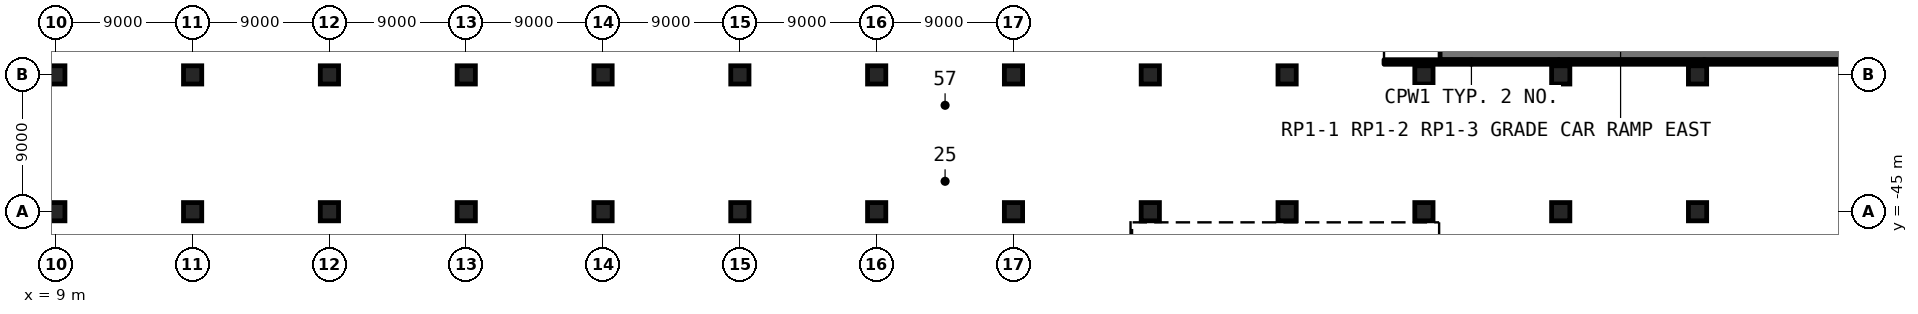
"""IFC4 building model, lengths in metres.
Left out: names, types, materials, properties, quantities, classifications, styles, units other than length and angle.
Written with IfcOpenShell. Run it as: python <this file> out.ifc"""

import sys

from ifc_helpers import new_model, si_unit, direction, frame, frame_2d, origin, origin_2d, place, context, subcontext, project, spatial, polyline, rectangle, outline, extrude, element, save


model = new_model("IFC4")
c1 = context("Model", 3, precision=1e-05, world=origin(), true_north=direction((0.0, 1.0)))
c2 = subcontext(c1, "Body", "Model", "MODEL_VIEW")
j1 = project(units=[si_unit("LENGTHUNIT", "METRE"), si_unit("PLANEANGLEUNIT", "RADIAN")], contexts=[c1])
p1 = place(None, origin())
s1 = spatial("IfcSite", under=j1, at=p1, CompositionType="ELEMENT")
p2 = place(p1, origin())
s2 = spatial("IfcBuilding", under=s1, at=p2, CompositionType="ELEMENT")
p3 = place(p2, frame((0.0, 0.0, -4.5)))
s3 = spatial("IfcBuildingStorey", under=s2, at=p3, CompositionType="ELEMENT", Elevation=-4.5)
for number, where, z_axis, x_axis in (
    (1, (9.0, -45.0, 0.0), (0.0, 0.0, 1.0), (1.0, 0.0, 0.0)),
    (2, (9.0, -36.0, 0.0), (0.0, 0.0, 1.0), (1.0, 0.0, 0.0)),
    (3, (18.0, -45.0, 0.0), (0.0, 0.0, 1.0), (1.0, 0.0, 0.0)),
    (4, (18.0, -36.0, 0.0), (0.0, 0.0, 1.0), (1.0, 0.0, 0.0)),
    (5, (27.0, -45.0, 0.0), (0.0, 0.0, 1.0), (1.0, 0.0, 0.0)),
    (6, (27.0, -36.0, 0.0), (0.0, 0.0, 1.0), (1.0, 0.0, 0.0)),
    (7, (36.0, -45.0, 0.0), (0.0, 0.0, 1.0), (1.0, 0.0, 0.0)),
    (8, (36.0, -36.0, 0.0), (0.0, 0.0, 1.0), (1.0, 0.0, 0.0)),
    (9, (45.0, -45.0, 0.0), (0.0, 0.0, 1.0), (1.0, 0.0, 0.0)),
    (10, (45.0, -36.0, 0.0), (0.0, 0.0, 1.0), (1.0, 0.0, 0.0)),
    (11, (54.0, -45.0, 0.0), (0.0, 0.0, 1.0), (1.0, 0.0, 0.0)),
    (12, (54.0, -36.0, 0.0), (0.0, 0.0, 1.0), (1.0, 0.0, 0.0)),
    (13, (63.0, -45.0, 0.0), (0.0, 0.0, 1.0), (1.0, 0.0, 0.0)),
    (14, (63.0, -36.0, 0.0), (0.0, 0.0, 1.0), (1.0, 0.0, 0.0)),
    (15, (72.0, -45.0, 0.0), (0.0, 0.0, 1.0), (1.0, 0.0, 0.0)),
    (16, (72.0, -36.0, 0.0), (0.0, 0.0, 1.0), (1.0, 0.0, 0.0)),
    (17, (81.0, -45.0, 0.0), (0.0, 0.0, 1.0), (1.0, 0.0, 0.0)),
    (18, (81.0, -36.0, 0.0), (0.0, 0.0, 1.0), (1.0, 0.0, 0.0)),
    (19, (90.0, -45.0, 0.0), (0.0, 0.0, 1.0), (1.0, 0.0, 0.0)),
    (20, (90.0, -36.0, 0.0), (0.0, 0.0, 1.0), (1.0, 0.0, 0.0)),
    (21, (99.0, -45.0, 0.0), (0.0, 0.0, 1.0), (1.0, 0.0, 0.0)),
    (22, (99.0, -36.0, 0.0), (0.0, 0.0, 1.0), (1.0, 0.0, 0.0)),
    (23, (108.0, -45.0, 0.0), (0.0, 0.0, 1.0), (1.0, 0.0, 0.0)),
    (24, (108.0, -36.0, 0.0), (0.0, 0.0, 1.0), (1.0, 0.0, 0.0)),
    (25, (117.0, -45.0, 0.0), (0.0, 0.0, 1.0), (1.0, 0.0, 0.0)),
    (26, (117.0, -36.0, 0.0), (0.0, 0.0, 1.0), (1.0, 0.0, 0.0)),
):
    element("IfcColumn", number, at=place(p3, frame(where, z_axis=z_axis, x_axis=x_axis)), inside=s3, PredefinedType="COLUMN", context=c2, shape_type="SweptSolid", body=[
        extrude(rectangle(XDim=1.2, YDim=1.2, at=origin_2d()), origin(), (0.0, 0.0, 1.0), 4.5),
    ])
p4 = place(p3, frame((100.062, -31.5, 0.0), z_axis=(0.0, 0.0, 1.0), x_axis=(1.0, 0.0, 0.0)))
e27 = element("IfcWall", 27, at=p4, inside=s3, PredefinedType="SOLIDWALL", context=c2, shape_type="SweptSolid", body=[
    extrude(outline(polyline([(0.0, 0.0), (27.438, 0.0), (27.438, 4.2), (24.438, 3.96), (0.0, 0.05), (0.0, 0.0)])), frame((0.0, 3.5, 0.0), z_axis=(0.0, -1.0, 0.0), x_axis=(1.0, 0.0, 0.0)), (0.0, 0.0, 1.0), 7.0),
])
p5 = place(p3, frame((96.375, -35.15, 0.0), z_axis=(0.0, 0.0, 1.0), x_axis=(1.0, 0.0, 0.0)))
e28 = element("IfcWall", 28, at=p5, inside=s3, PredefinedType="SOLIDWALL", context=c2, shape_type="SweptSolid", body=[
    extrude(rectangle(XDim=11.5, YDim=0.3, at=frame_2d((5.75, 0.0))), origin(), (0.0, 0.0, 1.0), 4.05),
])
p6 = place(p3, frame((107.875, -35.15, 0.0), z_axis=(0.0, 0.0, 1.0), x_axis=(1.0, 0.0, 0.0)))
e29 = element("IfcWall", 29, at=p6, inside=s3, PredefinedType="SOLIDWALL", context=c2, shape_type="SweptSolid", body=[
    extrude(rectangle(XDim=19.125, YDim=0.3, at=frame_2d((9.562, 0.0))), origin(), (0.0, 0.0, 1.0), 5.6),
])
save(model, sys.argv[1])
